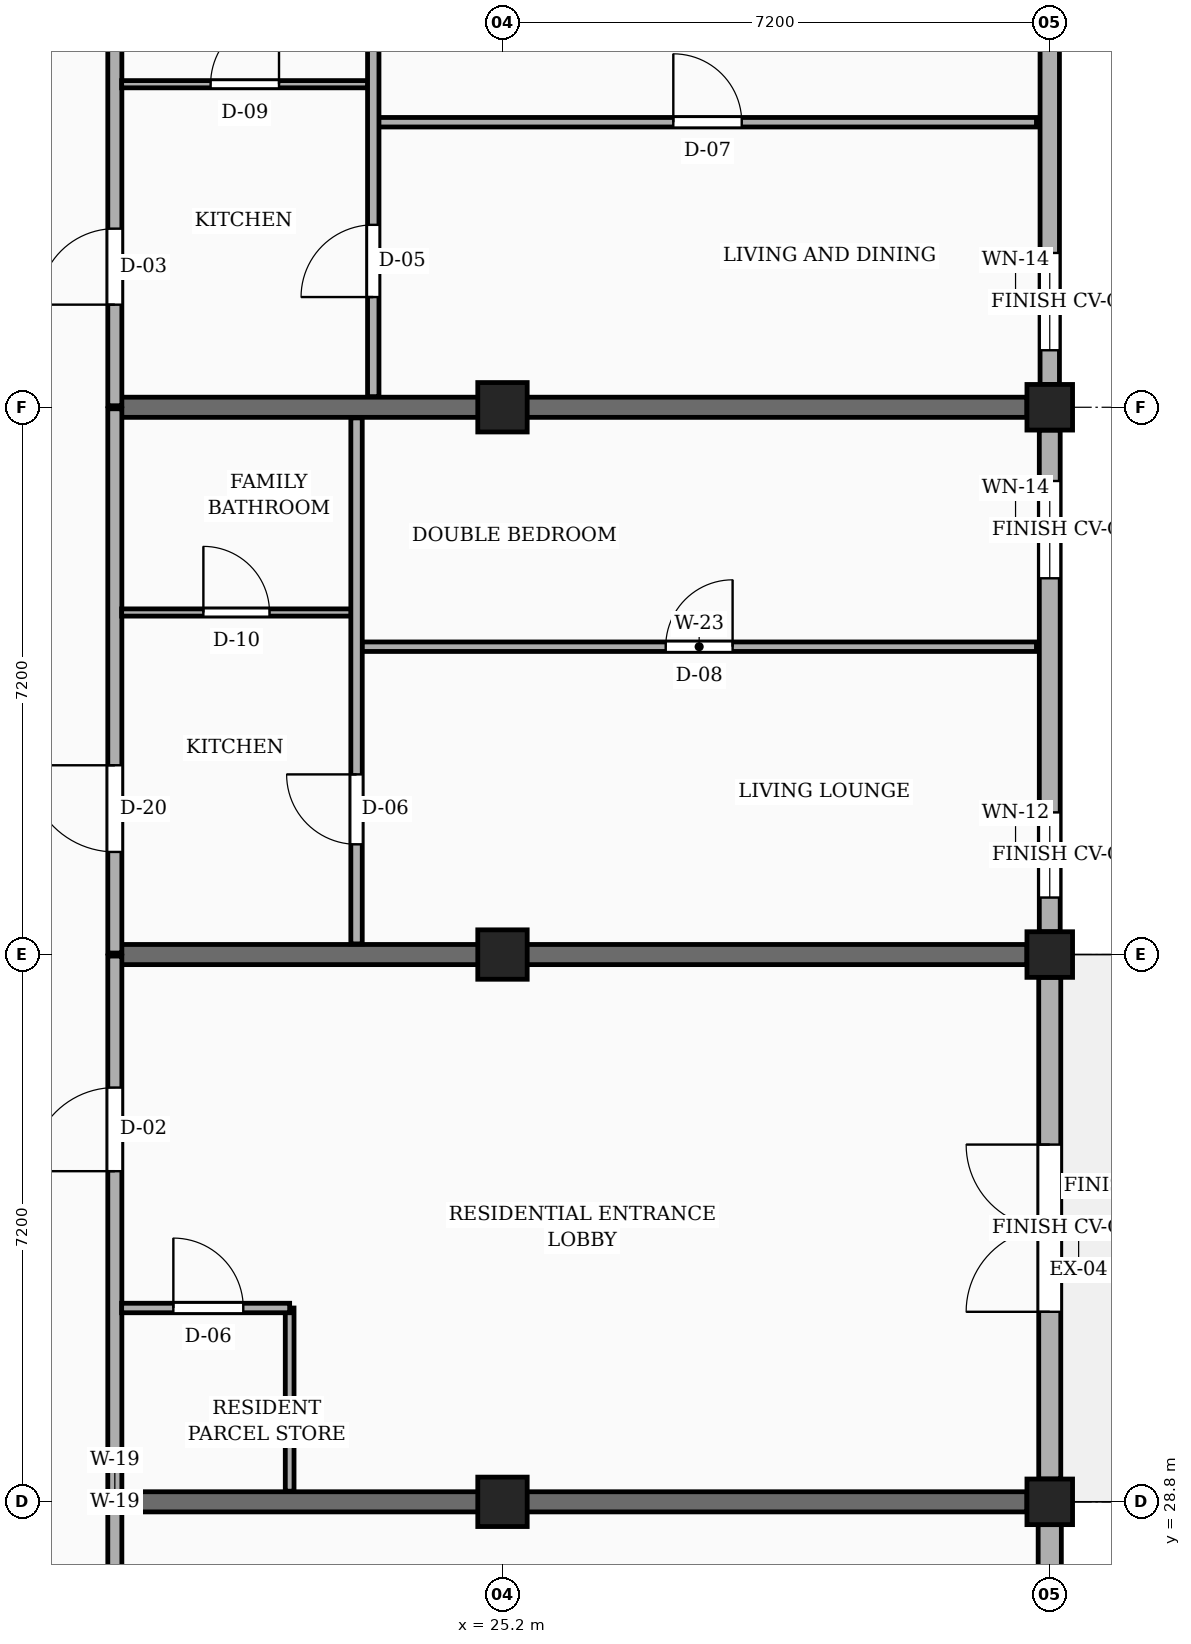
"""IFC4 building model, lengths in metres.
Left out: names, types, materials, properties, quantities, classifications, styles, units other than length and angle.
Written with IfcOpenShell. Run it as: python <this file> out.ifc"""

import sys

from ifc_helpers import new_model, si_unit, direction, frame, frame_2d, origin, origin_2d, place, context, subcontext, project, spatial, rectangle, extrude, element, fill, save


model = new_model("IFC4")
c1 = context("Model", 3, precision=1e-05, world=origin(), true_north=direction((0.0, 1.0)))
c2 = subcontext(c1, "Body", "Model", "MODEL_VIEW")
j1 = project(units=[si_unit("LENGTHUNIT", "METRE"), si_unit("PLANEANGLEUNIT", "RADIAN")], contexts=[c1])
p1 = place(None, origin())
s1 = spatial("IfcSite", under=j1, at=p1, CompositionType="ELEMENT")
p2 = place(p1, origin())
s2 = spatial("IfcBuilding", under=s1, at=p2, CompositionType="ELEMENT")
p3 = place(p2, origin())
s3 = spatial("IfcBuildingStorey", under=s2, at=p3, CompositionType="ELEMENT", Elevation=0.0)
for number, where, z_axis, x_axis in (
    (1, (25.2, 28.8, 0.0), (0.0, 0.0, 1.0), (1.0, 0.0, 0.0)),
    (2, (25.2, 36.0, 0.0), (0.0, 0.0, 1.0), (1.0, 0.0, 0.0)),
    (3, (25.2, 43.2, 0.0), (0.0, 0.0, 1.0), (1.0, 0.0, 0.0)),
):
    element("IfcColumn", number, at=place(p3, frame(where, z_axis=z_axis, x_axis=x_axis)), inside=s3, PredefinedType="COLUMN", context=c2, shape_type="SweptSolid", body=[
        extrude(rectangle(XDim=0.65, YDim=0.65, at=origin_2d()), origin(), (0.0, 0.0, 1.0), 4.5),
    ])
for number, where, z_axis, x_axis in (
    (4, (32.4, 28.8, 0.0), (0.0, 0.0, 1.0), (1.0, 0.0, 0.0)),
    (5, (32.4, 36.0, 0.0), (0.0, 0.0, 1.0), (1.0, 0.0, 0.0)),
    (6, (32.4, 43.2, 0.0), (0.0, 0.0, 1.0), (1.0, 0.0, 0.0)),
):
    element("IfcColumn", number, at=place(p3, frame(where, z_axis=z_axis, x_axis=x_axis)), inside=s3, PredefinedType="COLUMN", context=c2, shape_type="SweptSolid", body=[
        extrude(rectangle(XDim=0.6, YDim=0.6, at=origin_2d()), origin(), (0.0, 0.0, 1.0), 4.5),
    ])
for number, where, z_axis, x_axis in (
    (7, (20.1, 28.8, 0.0), (0.0, 0.0, 1.0), (1.0, 0.0, 0.0)),
    (8, (20.1, 36.0, 0.0), (0.0, 0.0, 1.0), (1.0, 0.0, 0.0)),
    (9, (20.1, 43.2, 0.0), (0.0, 0.0, 1.0), (1.0, 0.0, 0.0)),
):
    element("IfcWall", number, at=place(p3, frame(where, z_axis=z_axis, x_axis=x_axis)), inside=s3, PredefinedType="SOLIDWALL", context=c2, shape_type="SweptSolid", body=[
        extrude(rectangle(XDim=12.0, YDim=0.265, at=frame_2d((6.0, 0.0))), origin(), (0.0, 0.0, 1.0), 3.52),
    ])
p4 = place(p3, frame((32.4, 21.86, 0.0), z_axis=(0.0, 0.0, 1.0), x_axis=(0.0, 1.0, 0.0)))
e10 = element("IfcWall", 10, at=p4, inside=s3, PredefinedType="SOLIDWALL", context=c2, shape_type="SweptSolid", body=[
    extrude(rectangle(XDim=6.64, YDim=0.305, at=frame_2d((3.32, 0.0))), origin(), (0.0, 0.0, 1.0), 3.79),
])
p5 = place(p4, frame((0.45, 0.0, 0.78)))
e11 = element("IfcOpeningElement", 11, at=p5, cuts=e10, PredefinedType="OPENING", context=c2, shape_type="SweptSolid", body=[
    extrude(rectangle(XDim=0.96, YDim=1.26, at=frame_2d((0.48, 0.63))), frame((0.0, 0.163, 0.0), z_axis=(0.0, -1.0, 0.0), x_axis=(1.0, 0.0, 0.0)), (0.0, 0.0, 1.0), 0.325),
])
p6 = place(p4, frame((4.65, 0.0, 0.78)))
e12 = element("IfcOpeningElement", 12, at=p6, cuts=e10, PredefinedType="OPENING", context=c2, shape_type="SweptSolid", body=[
    extrude(rectangle(XDim=1.12, YDim=1.26, at=frame_2d((0.56, 0.63))), frame((0.0, 0.163, 0.0), z_axis=(0.0, -1.0, 0.0), x_axis=(1.0, 0.0, 0.0)), (0.0, 0.0, 1.0), 0.325),
])
p7 = place(p3, frame((32.4, 29.1, 0.0), z_axis=(0.0, 0.0, 1.0), x_axis=(0.0, 1.0, 0.0)))
e13 = element("IfcWall", 13, at=p7, inside=s3, PredefinedType="SOLIDWALL", context=c2, shape_type="SweptSolid", body=[
    extrude(rectangle(XDim=6.6, YDim=0.29, at=frame_2d((3.3, 0.0))), origin(), (0.0, 0.0, 1.0), 3.79),
])
p8 = place(p7, frame((2.2, 0.0, 0.0)))
e14 = element("IfcOpeningElement", 14, at=p8, cuts=e13, PredefinedType="OPENING", context=c2, shape_type="SweptSolid", body=[
    extrude(rectangle(XDim=2.2, YDim=2.35, at=frame_2d((1.1, 1.175))), frame((0.0, 0.155, 0.0), z_axis=(0.0, -1.0, 0.0), x_axis=(1.0, 0.0, 0.0)), (0.0, 0.0, 1.0), 0.31),
])
p9 = place(p3, frame((32.4, 36.3, 0.0), z_axis=(0.0, 0.0, 1.0), x_axis=(0.0, 1.0, 0.0)))
e15 = element("IfcWall", 15, at=p9, inside=s3, PredefinedType="SOLIDWALL", context=c2, shape_type="SweptSolid", body=[
    extrude(rectangle(XDim=6.6, YDim=0.275, at=frame_2d((3.3, 0.0))), origin(), (0.0, 0.0, 1.0), 3.79),
])
p10 = place(p9, frame((0.45, 0.0, 0.78)))
e16 = element("IfcOpeningElement", 16, at=p10, cuts=e15, PredefinedType="OPENING", context=c2, shape_type="SweptSolid", body=[
    extrude(rectangle(XDim=1.12, YDim=1.26, at=frame_2d((0.56, 0.63))), frame((0.0, 0.147, 0.0), z_axis=(0.0, -1.0, 0.0), x_axis=(1.0, 0.0, 0.0)), (0.0, 0.0, 1.0), 0.295),
])
p11 = place(p9, frame((4.65, 0.0, 0.78)))
e17 = element("IfcOpeningElement", 17, at=p11, cuts=e15, PredefinedType="OPENING", context=c2, shape_type="SweptSolid", body=[
    extrude(rectangle(XDim=1.28, YDim=1.26, at=frame_2d((0.64, 0.63))), frame((0.0, 0.147, 0.0), z_axis=(0.0, -1.0, 0.0), x_axis=(1.0, 0.0, 0.0)), (0.0, 0.0, 1.0), 0.295),
])
p12 = place(p3, frame((32.4, 43.5, 0.0), z_axis=(0.0, 0.0, 1.0), x_axis=(0.0, 1.0, 0.0)))
e18 = element("IfcWall", 18, at=p12, inside=s3, PredefinedType="SOLIDWALL", context=c2, shape_type="SweptSolid", body=[
    extrude(rectangle(XDim=6.64, YDim=0.255, at=frame_2d((3.32, 0.0))), origin(), (0.0, 0.0, 1.0), 3.79),
])
p13 = place(p12, frame((0.45, 0.0, 0.78)))
e19 = element("IfcOpeningElement", 19, at=p13, cuts=e18, PredefinedType="OPENING", context=c2, shape_type="SweptSolid", body=[
    extrude(rectangle(XDim=1.28, YDim=1.26, at=frame_2d((0.64, 0.63))), frame((0.0, 0.137, 0.0), z_axis=(0.0, -1.0, 0.0), x_axis=(1.0, 0.0, 0.0)), (0.0, 0.0, 1.0), 0.275),
])
p14 = place(p12, frame((4.65, 0.0, 0.78)))
e20 = element("IfcOpeningElement", 20, at=p14, cuts=e18, PredefinedType="OPENING", context=c2, shape_type="SweptSolid", body=[
    extrude(rectangle(XDim=1.44, YDim=1.26, at=frame_2d((0.72, 0.63))), frame((0.0, 0.137, 0.0), z_axis=(0.0, -1.0, 0.0), x_axis=(1.0, 0.0, 0.0)), (0.0, 0.0, 1.0), 0.275),
])
p15 = place(p3, frame((20.1, 21.62, 0.0), z_axis=(0.0, 0.0, 1.0), x_axis=(0.0, 1.0, 0.0)))
e21 = element("IfcWall", 21, at=p15, inside=s3, PredefinedType="PARTITIONING", context=c2, shape_type="SweptSolid", body=[
    extrude(rectangle(XDim=7.16, YDim=0.185, at=frame_2d((3.58, 0.0))), origin(), (0.0, 0.0, 1.0), 3.655),
])
p16 = place(p15, frame((1.78, 0.0, 0.0)))
e22 = element("IfcOpeningElement", 22, at=p16, cuts=e21, PredefinedType="OPENING", context=c2, shape_type="SweptSolid", body=[
    extrude(rectangle(XDim=1.1, YDim=2.15, at=frame_2d((0.55, 1.075))), frame((0.0, 0.103, 0.0), z_axis=(0.0, -1.0, 0.0), x_axis=(1.0, 0.0, 0.0)), (0.0, 0.0, 1.0), 0.205),
])
p17 = place(p3, frame((20.1, 28.82, 0.0), z_axis=(0.0, 0.0, 1.0), x_axis=(0.0, 1.0, 0.0)))
e23 = element("IfcWall", 23, at=p17, inside=s3, PredefinedType="PARTITIONING", context=c2, shape_type="SweptSolid", body=[
    extrude(rectangle(XDim=7.16, YDim=0.185, at=frame_2d((3.58, 0.0))), origin(), (0.0, 0.0, 1.0), 3.655),
])
p18 = place(p17, frame((4.33, 0.0, 0.0)))
e24 = element("IfcOpeningElement", 24, at=p18, cuts=e23, PredefinedType="OPENING", context=c2, shape_type="SweptSolid", body=[
    extrude(rectangle(XDim=1.1, YDim=2.15, at=frame_2d((0.55, 1.075))), frame((0.0, 0.103, 0.0), z_axis=(0.0, -1.0, 0.0), x_axis=(1.0, 0.0, 0.0)), (0.0, 0.0, 1.0), 0.205),
])
p19 = place(p3, frame((20.1, 36.02, 0.0), z_axis=(0.0, 0.0, 1.0), x_axis=(0.0, 1.0, 0.0)))
e25 = element("IfcWall", 25, at=p19, inside=s3, PredefinedType="PARTITIONING", context=c2, shape_type="SweptSolid", body=[
    extrude(rectangle(XDim=7.16, YDim=0.185, at=frame_2d((3.58, 0.0))), origin(), (0.0, 0.0, 1.0), 3.655),
])
p20 = place(p19, frame((1.33, 0.0, 0.0)))
e26 = element("IfcOpeningElement", 26, at=p20, cuts=e25, PredefinedType="OPENING", context=c2, shape_type="SweptSolid", body=[
    extrude(rectangle(XDim=1.14, YDim=2.18, at=frame_2d((0.57, 1.09))), frame((0.0, 0.103, 0.0), z_axis=(0.0, -1.0, 0.0), x_axis=(1.0, 0.0, 0.0)), (0.0, 0.0, 1.0), 0.205),
])
p21 = place(p3, frame((20.1, 43.22, 0.0), z_axis=(0.0, 0.0, 1.0), x_axis=(0.0, 1.0, 0.0)))
e27 = element("IfcWall", 27, at=p21, inside=s3, PredefinedType="PARTITIONING", context=c2, shape_type="SweptSolid", body=[
    extrude(rectangle(XDim=7.005, YDim=0.185, at=frame_2d((3.502, 0.0))), origin(), (0.0, 0.0, 1.0), 3.655),
])
p22 = place(p21, frame((1.33, 0.0, 0.0)))
e28 = element("IfcOpeningElement", 28, at=p22, cuts=e27, PredefinedType="OPENING", context=c2, shape_type="SweptSolid", body=[
    extrude(rectangle(XDim=1.0, YDim=2.15, at=frame_2d((0.5, 1.075))), frame((0.0, 0.103, 0.0), z_axis=(0.0, -1.0, 0.0), x_axis=(1.0, 0.0, 0.0)), (0.0, 0.0, 1.0), 0.205),
])
p23 = place(p3, frame((22.4, 28.94, 0.0), z_axis=(0.0, 0.0, 1.0), x_axis=(0.0, 1.0, 0.0)))
e29 = element("IfcWall", 29, at=p23, inside=s3, PredefinedType="PARTITIONING", context=c2, shape_type="SweptSolid", body=[
    extrude(rectangle(XDim=2.41, YDim=0.115, at=frame_2d((1.205, 0.0))), origin(), (0.0, 0.0, 1.0), 3.655),
])
p24 = place(p3, frame((20.19, 31.35, 0.0), z_axis=(0.0, 0.0, 1.0), x_axis=(1.0, 0.0, 0.0)))
e30 = element("IfcWall", 30, at=p24, inside=s3, PredefinedType="PARTITIONING", context=c2, shape_type="SweptSolid", body=[
    extrude(rectangle(XDim=2.21, YDim=0.125, at=frame_2d((1.105, 0.0))), origin(), (0.0, 0.0, 1.0), 3.655),
])
p25 = place(p24, frame((0.68, 0.0, 0.0)))
e31 = element("IfcOpeningElement", 31, at=p25, cuts=e30, PredefinedType="OPENING", context=c2, shape_type="SweptSolid", body=[
    extrude(rectangle(XDim=0.92, YDim=2.1, at=frame_2d((0.46, 1.05))), frame((0.0, 0.073, 0.0), z_axis=(0.0, -1.0, 0.0), x_axis=(1.0, 0.0, 0.0)), (0.0, 0.0, 1.0), 0.145),
])
p26 = place(p3, frame((23.35, 40.05, 0.0), z_axis=(0.0, 0.0, 1.0), x_axis=(1.0, 0.0, 0.0)))
e32 = element("IfcWall", 32, at=p26, inside=s3, PredefinedType="PARTITIONING", context=c2, shape_type="SweptSolid", body=[
    extrude(rectangle(XDim=8.875, YDim=0.125, at=frame_2d((4.438, 0.0))), origin(), (0.0, 0.0, 1.0), 3.655),
])
p27 = place(p26, frame((3.998, 0.0, 0.0)))
e33 = element("IfcOpeningElement", 33, at=p27, cuts=e32, PredefinedType="OPENING", context=c2, shape_type="SweptSolid", body=[
    extrude(rectangle(XDim=0.88, YDim=2.08, at=frame_2d((0.44, 1.04))), frame((0.0, 0.073, 0.0), z_axis=(0.0, -1.0, 0.0), x_axis=(1.0, 0.0, 0.0)), (0.0, 0.0, 1.0), 0.145),
])
p28 = place(p3, frame((20.19, 40.5, 0.0), z_axis=(0.0, 0.0, 1.0), x_axis=(1.0, 0.0, 0.0)))
e34 = element("IfcWall", 34, at=p28, inside=s3, PredefinedType="PARTITIONING", context=c2, shape_type="SweptSolid", body=[
    extrude(rectangle(XDim=3.02, YDim=0.095, at=frame_2d((1.51, 0.0))), origin(), (0.0, 0.0, 1.0), 3.655),
])
p29 = place(p28, frame((1.075, 0.0, 0.0)))
e35 = element("IfcOpeningElement", 35, at=p29, cuts=e34, PredefinedType="OPENING", context=c2, shape_type="SweptSolid", body=[
    extrude(rectangle(XDim=0.87, YDim=2.05, at=frame_2d((0.435, 1.025))), frame((0.0, 0.058, 0.0), z_axis=(0.0, -1.0, 0.0), x_axis=(1.0, 0.0, 0.0)), (0.0, 0.0, 1.0), 0.115),
])
p30 = place(p3, frame((23.28, 36.14, 0.0), z_axis=(0.0, 0.0, 1.0), x_axis=(0.0, 1.0, 0.0)))
e36 = element("IfcWall", 36, at=p30, inside=s3, PredefinedType="PARTITIONING", context=c2, shape_type="SweptSolid", body=[
    extrude(rectangle(XDim=6.92, YDim=0.15, at=frame_2d((3.46, 0.0))), origin(), (0.0, 0.0, 1.0), 3.655),
])
p31 = place(p30, frame((1.31, 0.0, 0.0)))
e37 = element("IfcOpeningElement", 37, at=p31, cuts=e36, PredefinedType="OPENING", context=c2, shape_type="SweptSolid", body=[
    extrude(rectangle(XDim=0.92, YDim=2.1, at=frame_2d((0.46, 1.05))), frame((0.0, 0.085, 0.0), z_axis=(0.0, -1.0, 0.0), x_axis=(1.0, 0.0, 0.0)), (0.0, 0.0, 1.0), 0.17),
])
p32 = place(p3, frame((23.57, 46.95, 0.0), z_axis=(0.0, 0.0, 1.0), x_axis=(1.0, 0.0, 0.0)))
e38 = element("IfcWall", 38, at=p32, inside=s3, PredefinedType="PARTITIONING", context=c2, shape_type="SweptSolid", body=[
    extrude(rectangle(XDim=8.655, YDim=0.125, at=frame_2d((4.328, 0.0))), origin(), (0.0, 0.0, 1.0), 3.655),
])
p33 = place(p32, frame((3.877, 0.0, 0.0)))
e39 = element("IfcOpeningElement", 39, at=p33, cuts=e38, PredefinedType="OPENING", context=c2, shape_type="SweptSolid", body=[
    extrude(rectangle(XDim=0.9, YDim=2.1, at=frame_2d((0.45, 1.05))), frame((0.0, 0.073, 0.0), z_axis=(0.0, -1.0, 0.0), x_axis=(1.0, 0.0, 0.0)), (0.0, 0.0, 1.0), 0.145),
])
p34 = place(p3, frame((20.19, 47.45, 0.0), z_axis=(0.0, 0.0, 1.0), x_axis=(1.0, 0.0, 0.0)))
e40 = element("IfcWall", 40, at=p34, inside=s3, PredefinedType="PARTITIONING", context=c2, shape_type="SweptSolid", body=[
    extrude(rectangle(XDim=3.24, YDim=0.095, at=frame_2d((1.62, 0.0))), origin(), (0.0, 0.0, 1.0), 3.655),
])
p35 = place(p34, frame((1.17, 0.0, 0.0)))
e41 = element("IfcOpeningElement", 41, at=p35, cuts=e40, PredefinedType="OPENING", context=c2, shape_type="SweptSolid", body=[
    extrude(rectangle(XDim=0.9, YDim=2.05, at=frame_2d((0.45, 1.025))), frame((0.0, 0.058, 0.0), z_axis=(0.0, -1.0, 0.0), x_axis=(1.0, 0.0, 0.0)), (0.0, 0.0, 1.0), 0.115),
])
p36 = place(p3, frame((23.5, 43.34, 0.0), z_axis=(0.0, 0.0, 1.0), x_axis=(0.0, 1.0, 0.0)))
e42 = element("IfcWall", 42, at=p36, inside=s3, PredefinedType="PARTITIONING", context=c2, shape_type="SweptSolid", body=[
    extrude(rectangle(XDim=6.885, YDim=0.15, at=frame_2d((3.442, 0.0))), origin(), (0.0, 0.0, 1.0), 3.655),
])
p37 = place(p36, frame((1.31, 0.0, 0.0)))
e43 = element("IfcOpeningElement", 43, at=p37, cuts=e42, PredefinedType="OPENING", context=c2, shape_type="SweptSolid", body=[
    extrude(rectangle(XDim=0.95, YDim=2.1, at=frame_2d((0.475, 1.05))), frame((0.0, 0.085, 0.0), z_axis=(0.0, -1.0, 0.0), x_axis=(1.0, 0.0, 0.0)), (0.0, 0.0, 1.0), 0.17),
])
p38 = place(p8, frame((2.2, 0.0, 0.0), z_axis=(0.0, 0.0, 1.0), x_axis=(-1.0, 0.0, 0.0)))
e44 = element("IfcDoor", 44, at=p38, inside=s3, OperationType="DOUBLE_DOOR_SINGLE_SWING", PredefinedType="DOOR", context=c2, shape_type="SweptSolid", body=[
    extrude(rectangle(XDim=2.2, YDim=2.35, at=frame_2d((1.1, 1.175))), frame((0.0, 0.025, 0.0), z_axis=(0.0, -1.0, 0.0), x_axis=(1.0, 0.0, 0.0)), (0.0, 0.0, 1.0), 0.05),
])
fill(e14, e44)
p39 = place(p10, origin())
e45 = element("IfcWindow", 45, at=p39, inside=s3, PartitioningType="SINGLE_PANEL", PredefinedType="WINDOW", context=c2, shape_type="SweptSolid", body=[
    extrude(rectangle(XDim=1.12, YDim=1.26, at=frame_2d((0.56, 0.63))), frame((0.0, 0.03, 0.0), z_axis=(0.0, -1.0, 0.0), x_axis=(1.0, 0.0, 0.0)), (0.0, 0.0, 1.0), 0.06),
])
fill(e16, e45)
p40 = place(p11, origin())
e46 = element("IfcWindow", 46, at=p40, inside=s3, PartitioningType="SINGLE_PANEL", PredefinedType="WINDOW", context=c2, shape_type="SweptSolid", body=[
    extrude(rectangle(XDim=1.28, YDim=1.26, at=frame_2d((0.64, 0.63))), frame((0.0, 0.03, 0.0), z_axis=(0.0, -1.0, 0.0), x_axis=(1.0, 0.0, 0.0)), (0.0, 0.0, 1.0), 0.06),
])
fill(e17, e46)
p41 = place(p13, origin())
e47 = element("IfcWindow", 47, at=p41, inside=s3, PartitioningType="SINGLE_PANEL", PredefinedType="WINDOW", context=c2, shape_type="SweptSolid", body=[
    extrude(rectangle(XDim=1.28, YDim=1.26, at=frame_2d((0.64, 0.63))), frame((0.0, 0.03, 0.0), z_axis=(0.0, -1.0, 0.0), x_axis=(1.0, 0.0, 0.0)), (0.0, 0.0, 1.0), 0.06),
])
fill(e19, e47)
p42 = place(p18, origin())
e48 = element("IfcDoor", 48, at=p42, inside=s3, OperationType="SINGLE_SWING_LEFT", PredefinedType="DOOR", context=c2, shape_type="SweptSolid", body=[
    extrude(rectangle(XDim=1.1, YDim=2.15, at=frame_2d((0.55, 1.075))), frame((0.0, 0.025, 0.0), z_axis=(0.0, -1.0, 0.0), x_axis=(1.0, 0.0, 0.0)), (0.0, 0.0, 1.0), 0.05),
])
fill(e24, e48)
p43 = place(p20, origin())
e49 = element("IfcDoor", 49, at=p43, inside=s3, OperationType="SINGLE_SWING_RIGHT", PredefinedType="DOOR", context=c2, shape_type="SweptSolid", body=[
    extrude(rectangle(XDim=1.14, YDim=2.18, at=frame_2d((0.57, 1.09))), frame((0.0, 0.025, 0.0), z_axis=(0.0, -1.0, 0.0), x_axis=(1.0, 0.0, 0.0)), (0.0, 0.0, 1.0), 0.05),
])
fill(e26, e49)
p44 = place(p22, origin())
e50 = element("IfcDoor", 50, at=p44, inside=s3, OperationType="SINGLE_SWING_LEFT", PredefinedType="DOOR", context=c2, shape_type="SweptSolid", body=[
    extrude(rectangle(XDim=1.0, YDim=2.15, at=frame_2d((0.5, 1.075))), frame((0.0, 0.025, 0.0), z_axis=(0.0, -1.0, 0.0), x_axis=(1.0, 0.0, 0.0)), (0.0, 0.0, 1.0), 0.05),
])
fill(e28, e50)
p45 = place(p25, origin())
e51 = element("IfcDoor", 51, at=p45, inside=s3, OperationType="SINGLE_SWING_LEFT", PredefinedType="DOOR", context=c2, shape_type="SweptSolid", body=[
    extrude(rectangle(XDim=0.92, YDim=2.1, at=frame_2d((0.46, 1.05))), frame((0.0, 0.025, 0.0), z_axis=(0.0, -1.0, 0.0), x_axis=(1.0, 0.0, 0.0)), (0.0, 0.0, 1.0), 0.05),
])
fill(e31, e51)
p46 = place(p27, origin())
e52 = element("IfcDoor", 52, at=p46, inside=s3, OperationType="SINGLE_SWING_RIGHT", PredefinedType="DOOR", context=c2, shape_type="SweptSolid", body=[
    extrude(rectangle(XDim=0.88, YDim=2.08, at=frame_2d((0.44, 1.04))), frame((0.0, 0.025, 0.0), z_axis=(0.0, -1.0, 0.0), x_axis=(1.0, 0.0, 0.0)), (0.0, 0.0, 1.0), 0.05),
])
fill(e33, e52)
p47 = place(p29, origin())
e53 = element("IfcDoor", 53, at=p47, inside=s3, OperationType="SINGLE_SWING_LEFT", PredefinedType="DOOR", context=c2, shape_type="SweptSolid", body=[
    extrude(rectangle(XDim=0.87, YDim=2.05, at=frame_2d((0.435, 1.025))), frame((0.0, 0.025, 0.0), z_axis=(0.0, -1.0, 0.0), x_axis=(1.0, 0.0, 0.0)), (0.0, 0.0, 1.0), 0.05),
])
fill(e35, e53)
p48 = place(p31, origin())
e54 = element("IfcDoor", 54, at=p48, inside=s3, OperationType="SINGLE_SWING_RIGHT", PredefinedType="DOOR", context=c2, shape_type="SweptSolid", body=[
    extrude(rectangle(XDim=0.92, YDim=2.1, at=frame_2d((0.46, 1.05))), frame((0.0, 0.025, 0.0), z_axis=(0.0, -1.0, 0.0), x_axis=(1.0, 0.0, 0.0)), (0.0, 0.0, 1.0), 0.05),
])
fill(e37, e54)
p49 = place(p33, origin())
e55 = element("IfcDoor", 55, at=p49, inside=s3, OperationType="SINGLE_SWING_LEFT", PredefinedType="DOOR", context=c2, shape_type="SweptSolid", body=[
    extrude(rectangle(XDim=0.9, YDim=2.1, at=frame_2d((0.45, 1.05))), frame((0.0, 0.025, 0.0), z_axis=(0.0, -1.0, 0.0), x_axis=(1.0, 0.0, 0.0)), (0.0, 0.0, 1.0), 0.05),
])
fill(e39, e55)
p50 = place(p35, origin())
e56 = element("IfcDoor", 56, at=p50, inside=s3, OperationType="SINGLE_SWING_RIGHT", PredefinedType="DOOR", context=c2, shape_type="SweptSolid", body=[
    extrude(rectangle(XDim=0.9, YDim=2.05, at=frame_2d((0.45, 1.025))), frame((0.0, 0.025, 0.0), z_axis=(0.0, -1.0, 0.0), x_axis=(1.0, 0.0, 0.0)), (0.0, 0.0, 1.0), 0.05),
])
fill(e41, e56)
p51 = place(p37, origin())
e57 = element("IfcDoor", 57, at=p51, inside=s3, OperationType="SINGLE_SWING_LEFT", PredefinedType="DOOR", context=c2, shape_type="SweptSolid", body=[
    extrude(rectangle(XDim=0.95, YDim=2.1, at=frame_2d((0.475, 1.05))), frame((0.0, 0.025, 0.0), z_axis=(0.0, -1.0, 0.0), x_axis=(1.0, 0.0, 0.0)), (0.0, 0.0, 1.0), 0.05),
])
fill(e43, e57)
save(model, sys.argv[1])
